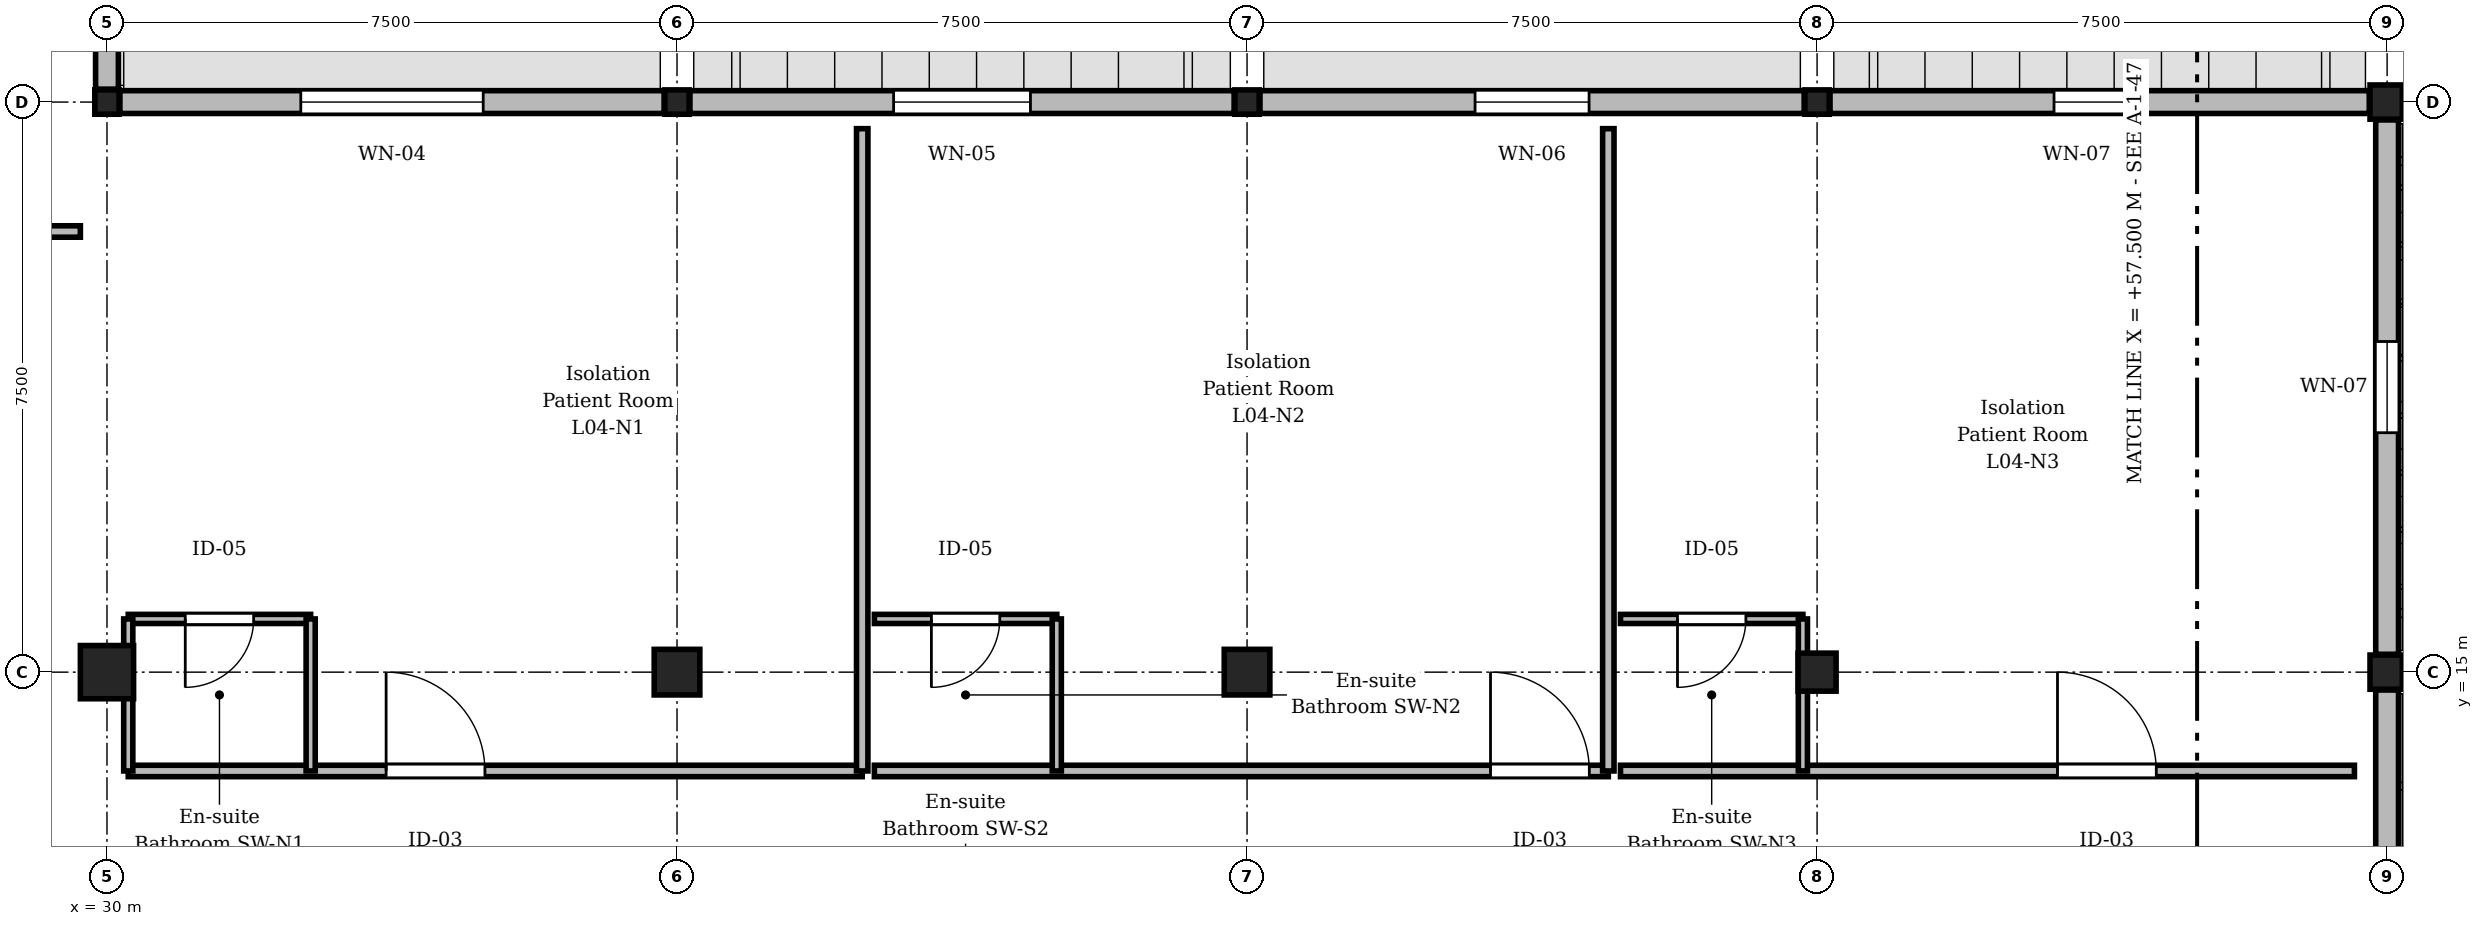
"""IFC4 building model, lengths in metres.
Left out: names, types, materials, properties, quantities, classifications, styles, units other than length and angle.
Written with IfcOpenShell. Run it as: python <this file> out.ifc"""

import sys

from ifc_helpers import new_model, si_unit, direction, frame, frame_2d, origin, origin_2d, place, context, subcontext, project, spatial, rectangle, extrude, element, fill, save


model = new_model("IFC4")
c1 = context("Model", 3, precision=1e-05, world=origin(), true_north=direction((0.0, 1.0)))
c2 = subcontext(c1, "Body", "Model", "MODEL_VIEW")
j1 = project(units=[si_unit("LENGTHUNIT", "METRE"), si_unit("PLANEANGLEUNIT", "RADIAN")], contexts=[c1])
p1 = place(None, origin())
s1 = spatial("IfcSite", under=j1, at=p1, CompositionType="ELEMENT")
p2 = place(p1, origin())
s2 = spatial("IfcBuilding", under=s1, at=p2, CompositionType="ELEMENT")
p3 = place(p2, frame((0.0, 0.0, 17.85)))
s3 = spatial("IfcBuildingStorey", under=s2, at=p3, CompositionType="ELEMENT", Elevation=17.85)
p4 = place(p3, frame((30.0, 15.0, 0.0), z_axis=(0.0, 0.0, 1.0), x_axis=(1.0, 0.0, 0.0)))
e1 = element("IfcColumn", 1, at=p4, inside=s3, PredefinedType="COLUMN", context=c2, shape_type="SweptSolid", body=[
    extrude(rectangle(XDim=0.7, YDim=0.7, at=origin_2d()), origin(), (0.0, 0.0, 1.0), 4.05),
])
p5 = place(p3, frame((30.0, 22.5, 0.0), z_axis=(0.0, 0.0, 1.0), x_axis=(1.0, 0.0, 0.0)))
e2 = element("IfcColumn", 2, at=p5, inside=s3, PredefinedType="COLUMN", context=c2, shape_type="SweptSolid", body=[
    extrude(rectangle(XDim=0.32, YDim=0.32, at=origin_2d()), origin(), (0.0, 0.0, 1.0), 4.05),
])
p6 = place(p3, frame((37.5, 15.0, 0.0), z_axis=(0.0, 0.0, 1.0), x_axis=(1.0, 0.0, 0.0)))
e3 = element("IfcColumn", 3, at=p6, inside=s3, PredefinedType="COLUMN", context=c2, shape_type="SweptSolid", body=[
    extrude(rectangle(XDim=0.6, YDim=0.6, at=origin_2d()), origin(), (0.0, 0.0, 1.0), 4.05),
])
p7 = place(p3, frame((37.5, 22.5, 0.0), z_axis=(0.0, 0.0, 1.0), x_axis=(1.0, 0.0, 0.0)))
e4 = element("IfcColumn", 4, at=p7, inside=s3, PredefinedType="COLUMN", context=c2, shape_type="SweptSolid", body=[
    extrude(rectangle(XDim=0.32, YDim=0.32, at=origin_2d()), origin(), (0.0, 0.0, 1.0), 4.05),
])
p8 = place(p3, frame((45.0, 15.0, 0.0), z_axis=(0.0, 0.0, 1.0), x_axis=(1.0, 0.0, 0.0)))
e5 = element("IfcColumn", 5, at=p8, inside=s3, PredefinedType="COLUMN", context=c2, shape_type="SweptSolid", body=[
    extrude(rectangle(XDim=0.6, YDim=0.6, at=origin_2d()), origin(), (0.0, 0.0, 1.0), 4.05),
])
p9 = place(p3, frame((45.0, 22.5, 0.0), z_axis=(0.0, 0.0, 1.0), x_axis=(1.0, 0.0, 0.0)))
e6 = element("IfcColumn", 6, at=p9, inside=s3, PredefinedType="COLUMN", context=c2, shape_type="SweptSolid", body=[
    extrude(rectangle(XDim=0.32, YDim=0.32, at=origin_2d()), origin(), (0.0, 0.0, 1.0), 4.05),
])
p10 = place(p3, frame((52.5, 15.0, 0.0), z_axis=(0.0, 0.0, 1.0), x_axis=(1.0, 0.0, 0.0)))
e7 = element("IfcColumn", 7, at=p10, inside=s3, PredefinedType="COLUMN", context=c2, shape_type="SweptSolid", body=[
    extrude(rectangle(XDim=0.5, YDim=0.5, at=origin_2d()), origin(), (0.0, 0.0, 1.0), 4.05),
])
p11 = place(p3, frame((52.5, 22.5, 0.0), z_axis=(0.0, 0.0, 1.0), x_axis=(1.0, 0.0, 0.0)))
e8 = element("IfcColumn", 8, at=p11, inside=s3, PredefinedType="COLUMN", context=c2, shape_type="SweptSolid", body=[
    extrude(rectangle(XDim=0.32, YDim=0.32, at=origin_2d()), origin(), (0.0, 0.0, 1.0), 4.05),
])
for number, where, z_axis, x_axis in (
    (9, (60.0, 15.0, 0.0), (0.0, 0.0, 1.0), (1.0, 0.0, 0.0)),
    (10, (60.0, 22.5, 0.0), (0.0, 0.0, 1.0), (1.0, 0.0, 0.0)),
):
    element("IfcColumn", number, at=place(p3, frame(where, z_axis=z_axis, x_axis=x_axis)), inside=s3, PredefinedType="COLUMN", context=c2, shape_type="SweptSolid", body=[
        extrude(rectangle(XDim=0.45, YDim=0.45, at=origin_2d()), origin(), (0.0, 0.0, 1.0), 4.05),
    ])
p12 = place(p3, frame((30.0, 31.33, 0.0), z_axis=(0.0, 0.0, 1.0), x_axis=(0.0, -1.0, 0.0)))
e11 = element("IfcWall", 11, at=p12, inside=s3, PredefinedType="STANDARD", context=c2, shape_type="SweptSolid", body=[
    extrude(rectangle(XDim=8.66, YDim=0.3, at=frame_2d((4.33, 0.0))), origin(), (0.0, 0.0, 1.0), 3.22),
])
p13 = place(p12, frame((3.13, 0.0, 0.9)))
e12 = element("IfcOpeningElement", 12, at=p13, cuts=e11, PredefinedType="OPENING", context=c2, shape_type="SweptSolid", body=[
    extrude(rectangle(XDim=2.4, YDim=2.04, at=frame_2d((1.2, 1.02))), frame((0.0, 0.16, 0.0), z_axis=(0.0, -1.0, 0.0), x_axis=(1.0, 0.0, 0.0)), (0.0, 0.0, 1.0), 0.32),
])
p14 = place(p3, frame((30.17, 22.5, 0.0), z_axis=(0.0, 0.0, 1.0), x_axis=(1.0, 0.0, 0.0)))
e13 = element("IfcWall", 13, at=p14, inside=s3, PredefinedType="STANDARD", context=c2, shape_type="SweptSolid", body=[
    extrude(rectangle(XDim=7.16, YDim=0.3, at=frame_2d((3.58, 0.0))), origin(), (0.0, 0.0, 1.0), 3.17),
])
p15 = place(p14, frame((2.38, 0.0, 0.9)))
e14 = element("IfcOpeningElement", 14, at=p15, cuts=e13, PredefinedType="OPENING", context=c2, shape_type="SweptSolid", body=[
    extrude(rectangle(XDim=2.4, YDim=1.99, at=frame_2d((1.2, 0.995))), frame((0.0, 0.16, 0.0), z_axis=(0.0, -1.0, 0.0), x_axis=(1.0, 0.0, 0.0)), (0.0, 0.0, 1.0), 0.32),
])
p16 = place(p3, frame((37.67, 22.5, 0.0), z_axis=(0.0, 0.0, 1.0), x_axis=(1.0, 0.0, 0.0)))
e15 = element("IfcWall", 15, at=p16, inside=s3, PredefinedType="STANDARD", context=c2, shape_type="SweptSolid", body=[
    extrude(rectangle(XDim=7.16, YDim=0.3, at=frame_2d((3.58, 0.0))), origin(), (0.0, 0.0, 1.0), 3.17),
])
p17 = place(p16, frame((2.68, 0.0, 0.9)))
e16 = element("IfcOpeningElement", 16, at=p17, cuts=e15, PredefinedType="OPENING", context=c2, shape_type="SweptSolid", body=[
    extrude(rectangle(XDim=1.8, YDim=1.99, at=frame_2d((0.9, 0.995))), frame((0.0, 0.16, 0.0), z_axis=(0.0, -1.0, 0.0), x_axis=(1.0, 0.0, 0.0)), (0.0, 0.0, 1.0), 0.32),
])
p18 = place(p3, frame((45.17, 22.5, 0.0), z_axis=(0.0, 0.0, 1.0), x_axis=(1.0, 0.0, 0.0)))
e17 = element("IfcWall", 17, at=p18, inside=s3, PredefinedType="STANDARD", context=c2, shape_type="SweptSolid", body=[
    extrude(rectangle(XDim=7.16, YDim=0.3, at=frame_2d((3.58, 0.0))), origin(), (0.0, 0.0, 1.0), 3.17),
])
p19 = place(p18, frame((2.83, 0.0, 0.9)))
e18 = element("IfcOpeningElement", 18, at=p19, cuts=e17, PredefinedType="OPENING", context=c2, shape_type="SweptSolid", body=[
    extrude(rectangle(XDim=1.5, YDim=1.99, at=frame_2d((0.75, 0.995))), frame((0.0, 0.16, 0.0), z_axis=(0.0, -1.0, 0.0), x_axis=(1.0, 0.0, 0.0)), (0.0, 0.0, 1.0), 0.32),
])
p20 = place(p3, frame((60.0, 14.765, 0.0), z_axis=(0.0, 0.0, 1.0), x_axis=(0.0, -1.0, 0.0)))
e19 = element("IfcWall", 19, at=p20, inside=s3, PredefinedType="STANDARD", context=c2, shape_type="SweptSolid", body=[
    extrude(rectangle(XDim=7.03, YDim=0.3, at=frame_2d((3.515, 0.0))), origin(), (0.0, 0.0, 1.0), 3.17),
])
p21 = place(p20, frame((2.765, 0.0, 0.9)))
e20 = element("IfcOpeningElement", 20, at=p21, cuts=e19, PredefinedType="OPENING", context=c2, shape_type="SweptSolid", body=[
    extrude(rectangle(XDim=1.5, YDim=1.99, at=frame_2d((0.75, 0.995))), frame((0.0, 0.16, 0.0), z_axis=(0.0, -1.0, 0.0), x_axis=(1.0, 0.0, 0.0)), (0.0, 0.0, 1.0), 0.32),
])
p22 = place(p3, frame((52.67, 22.5, 0.0), z_axis=(0.0, 0.0, 1.0), x_axis=(1.0, 0.0, 0.0)))
e21 = element("IfcWall", 21, at=p22, inside=s3, PredefinedType="STANDARD", context=c2, shape_type="SweptSolid", body=[
    extrude(rectangle(XDim=7.095, YDim=0.3, at=frame_2d((3.547, 0.0))), origin(), (0.0, 0.0, 1.0), 3.17),
])
p23 = place(p22, frame((2.948, 0.0, 0.9)))
e22 = element("IfcOpeningElement", 22, at=p23, cuts=e21, PredefinedType="OPENING", context=c2, shape_type="SweptSolid", body=[
    extrude(rectangle(XDim=1.2, YDim=1.99, at=frame_2d((0.6, 0.995))), frame((0.0, 0.16, 0.0), z_axis=(0.0, -1.0, 0.0), x_axis=(1.0, 0.0, 0.0)), (0.0, 0.0, 1.0), 0.32),
])
p24 = place(p3, frame((60.0, 22.265, 0.0), z_axis=(0.0, 0.0, 1.0), x_axis=(0.0, -1.0, 0.0)))
e23 = element("IfcWall", 23, at=p24, inside=s3, PredefinedType="STANDARD", context=c2, shape_type="SweptSolid", body=[
    extrude(rectangle(XDim=7.03, YDim=0.3, at=frame_2d((3.515, 0.0))), origin(), (0.0, 0.0, 1.0), 3.17),
])
p25 = place(p24, frame((2.915, 0.0, 0.9)))
e24 = element("IfcOpeningElement", 24, at=p25, cuts=e23, PredefinedType="OPENING", context=c2, shape_type="SweptSolid", body=[
    extrude(rectangle(XDim=1.2, YDim=1.99, at=frame_2d((0.6, 0.995))), frame((0.0, 0.16, 0.0), z_axis=(0.0, -1.0, 0.0), x_axis=(1.0, 0.0, 0.0)), (0.0, 0.0, 1.0), 0.32),
])
p26 = place(p3, frame((30.28, 13.7, 0.0), z_axis=(0.0, 0.0, 1.0), x_axis=(1.0, 0.0, 0.0)))
e25 = element("IfcWall", 25, at=p26, inside=s3, PredefinedType="PARTITIONING", context=c2, shape_type="SweptSolid", body=[
    extrude(rectangle(XDim=9.657, YDim=0.15, at=frame_2d((4.828, 0.0))), origin(), (0.0, 0.0, 1.0), 3.755),
])
p27 = place(p26, frame((3.393, 0.0, 0.0)))
e26 = element("IfcOpeningElement", 26, at=p27, cuts=e25, PredefinedType="OPENING", context=c2, shape_type="SweptSolid", body=[
    extrude(rectangle(XDim=1.3, YDim=2.2, at=frame_2d((0.65, 1.1))), frame((0.0, 0.085, 0.0), z_axis=(0.0, -1.0, 0.0), x_axis=(1.0, 0.0, 0.0)), (0.0, 0.0, 1.0), 0.17),
])
p28 = place(p3, frame((32.68, 15.7, 0.0), z_axis=(0.0, 0.0, 1.0), x_axis=(-1.0, 0.0, 0.0)))
e27 = element("IfcWall", 27, at=p28, inside=s3, PredefinedType="PARTITIONING", context=c2, shape_type="SweptSolid", body=[
    extrude(rectangle(XDim=2.4, YDim=0.12, at=frame_2d((1.2, 0.0))), origin(), (0.0, 0.0, 1.0), 3.755),
])
p29 = place(p28, frame((0.75, 0.0, 0.0)))
e28 = element("IfcOpeningElement", 28, at=p29, cuts=e27, PredefinedType="OPENING", context=c2, shape_type="SweptSolid", body=[
    extrude(rectangle(XDim=0.9, YDim=2.1, at=frame_2d((0.45, 1.05))), frame((0.0, 0.07, 0.0), z_axis=(0.0, -1.0, 0.0), x_axis=(1.0, 0.0, 0.0)), (0.0, 0.0, 1.0), 0.14),
])
p30 = place(p3, frame((32.68, 13.7, 0.0), z_axis=(0.0, 0.0, 1.0), x_axis=(0.0, 1.0, 0.0)))
e29 = element("IfcWall", 29, at=p30, inside=s3, PredefinedType="PARTITIONING", context=c2, shape_type="SweptSolid", body=[
    extrude(rectangle(XDim=2.0, YDim=0.12, at=frame_2d((1.0, 0.0))), origin(), (0.0, 0.0, 1.0), 3.755),
])
p31 = place(p3, frame((40.097, 13.7, 0.0), z_axis=(0.0, 0.0, 1.0), x_axis=(1.0, 0.0, 0.0)))
e30 = element("IfcWall", 30, at=p31, inside=s3, PredefinedType="PARTITIONING", context=c2, shape_type="SweptSolid", body=[
    extrude(rectangle(XDim=9.657, YDim=0.15, at=frame_2d((4.828, 0.0))), origin(), (0.0, 0.0, 1.0), 3.755),
])
p32 = place(p31, frame((8.107, 0.0, 0.0)))
e31 = element("IfcOpeningElement", 31, at=p32, cuts=e30, PredefinedType="OPENING", context=c2, shape_type="SweptSolid", body=[
    extrude(rectangle(XDim=1.3, YDim=2.2, at=frame_2d((0.65, 1.1))), frame((0.0, 0.085, 0.0), z_axis=(0.0, -1.0, 0.0), x_axis=(1.0, 0.0, 0.0)), (0.0, 0.0, 1.0), 0.17),
])
p33 = place(p3, frame((42.497, 15.7, 0.0), z_axis=(0.0, 0.0, 1.0), x_axis=(-1.0, 0.0, 0.0)))
e32 = element("IfcWall", 32, at=p33, inside=s3, PredefinedType="PARTITIONING", context=c2, shape_type="SweptSolid", body=[
    extrude(rectangle(XDim=2.4, YDim=0.12, at=frame_2d((1.2, 0.0))), origin(), (0.0, 0.0, 1.0), 3.755),
])
p34 = place(p33, frame((0.75, 0.0, 0.0)))
e33 = element("IfcOpeningElement", 33, at=p34, cuts=e32, PredefinedType="OPENING", context=c2, shape_type="SweptSolid", body=[
    extrude(rectangle(XDim=0.9, YDim=2.1, at=frame_2d((0.45, 1.05))), frame((0.0, 0.07, 0.0), z_axis=(0.0, -1.0, 0.0), x_axis=(1.0, 0.0, 0.0)), (0.0, 0.0, 1.0), 0.14),
])
p35 = place(p3, frame((42.497, 13.7, 0.0), z_axis=(0.0, 0.0, 1.0), x_axis=(0.0, 1.0, 0.0)))
e34 = element("IfcWall", 34, at=p35, inside=s3, PredefinedType="PARTITIONING", context=c2, shape_type="SweptSolid", body=[
    extrude(rectangle(XDim=2.0, YDim=0.12, at=frame_2d((1.0, 0.0))), origin(), (0.0, 0.0, 1.0), 3.755),
])
p36 = place(p3, frame((49.913, 13.7, 0.0), z_axis=(0.0, 0.0, 1.0), x_axis=(1.0, 0.0, 0.0)))
e35 = element("IfcWall", 35, at=p36, inside=s3, PredefinedType="PARTITIONING", context=c2, shape_type="SweptSolid", body=[
    extrude(rectangle(XDim=9.657, YDim=0.15, at=frame_2d((4.828, 0.0))), origin(), (0.0, 0.0, 1.0), 3.755),
])
p37 = place(p36, frame((5.75, 0.0, 0.0)))
e36 = element("IfcOpeningElement", 36, at=p37, cuts=e35, PredefinedType="OPENING", context=c2, shape_type="SweptSolid", body=[
    extrude(rectangle(XDim=1.3, YDim=2.2, at=frame_2d((0.65, 1.1))), frame((0.0, 0.085, 0.0), z_axis=(0.0, -1.0, 0.0), x_axis=(1.0, 0.0, 0.0)), (0.0, 0.0, 1.0), 0.17),
])
p38 = place(p3, frame((52.313, 15.7, 0.0), z_axis=(0.0, 0.0, 1.0), x_axis=(-1.0, 0.0, 0.0)))
e37 = element("IfcWall", 37, at=p38, inside=s3, PredefinedType="PARTITIONING", context=c2, shape_type="SweptSolid", body=[
    extrude(rectangle(XDim=2.4, YDim=0.12, at=frame_2d((1.2, 0.0))), origin(), (0.0, 0.0, 1.0), 3.755),
])
p39 = place(p38, frame((0.75, 0.0, 0.0)))
e38 = element("IfcOpeningElement", 38, at=p39, cuts=e37, PredefinedType="OPENING", context=c2, shape_type="SweptSolid", body=[
    extrude(rectangle(XDim=0.9, YDim=2.1, at=frame_2d((0.45, 1.05))), frame((0.0, 0.07, 0.0), z_axis=(0.0, -1.0, 0.0), x_axis=(1.0, 0.0, 0.0)), (0.0, 0.0, 1.0), 0.14),
])
p40 = place(p3, frame((52.313, 13.7, 0.0), z_axis=(0.0, 0.0, 1.0), x_axis=(0.0, 1.0, 0.0)))
e39 = element("IfcWall", 39, at=p40, inside=s3, PredefinedType="PARTITIONING", context=c2, shape_type="SweptSolid", body=[
    extrude(rectangle(XDim=2.0, YDim=0.12, at=frame_2d((1.0, 0.0))), origin(), (0.0, 0.0, 1.0), 3.205),
])
p41 = place(p3, frame((18.45, 20.797, 0.0), z_axis=(0.0, 0.0, 1.0), x_axis=(1.0, 0.0, 0.0)))
e40 = element("IfcWall", 40, at=p41, inside=s3, PredefinedType="PARTITIONING", context=c2, shape_type="SweptSolid", body=[
    extrude(rectangle(XDim=11.2, YDim=0.15, at=frame_2d((5.6, 0.0))), origin(), (0.0, 0.0, 1.0), 3.755),
])
for number, where, z_axis, x_axis in (
    (41, (39.937, 13.7, 0.0), (0.0, 0.0, 1.0), (0.0, 1.0, 0.0)),
    (42, (49.753, 13.7, 0.0), (0.0, 0.0, 1.0), (0.0, 1.0, 0.0)),
):
    element("IfcWall", number, at=place(p3, frame(where, z_axis=z_axis, x_axis=x_axis)), inside=s3, PredefinedType="PARTITIONING", context=c2, shape_type="SweptSolid", body=[
        extrude(rectangle(XDim=8.45, YDim=0.15, at=frame_2d((4.225, 0.0))), origin(), (0.0, 0.0, 1.0), 3.755),
    ])
p42 = place(p3, frame((30.28, 13.7, 0.0), z_axis=(0.0, 0.0, 1.0), x_axis=(0.0, 1.0, 0.0)))
e43 = element("IfcWall", 43, at=p42, inside=s3, PredefinedType="PARTITIONING", context=c2, shape_type="SweptSolid", body=[
    extrude(rectangle(XDim=2.0, YDim=0.12, at=frame_2d((1.0, 0.0))), origin(), (0.0, 0.0, 1.0), 3.205),
])
p43 = place(p15, origin())
e44 = element("IfcWindow", 44, at=p43, inside=s3, PartitioningType="SINGLE_PANEL", PredefinedType="WINDOW", context=c2, shape_type="SweptSolid", body=[
    extrude(rectangle(XDim=2.4, YDim=1.99, at=frame_2d((1.2, 0.995))), frame((0.0, 0.03, 0.0), z_axis=(0.0, -1.0, 0.0), x_axis=(1.0, 0.0, 0.0)), (0.0, 0.0, 1.0), 0.06),
])
fill(e14, e44)
p44 = place(p17, origin())
e45 = element("IfcWindow", 45, at=p44, inside=s3, PartitioningType="SINGLE_PANEL", PredefinedType="WINDOW", context=c2, shape_type="SweptSolid", body=[
    extrude(rectangle(XDim=1.8, YDim=1.99, at=frame_2d((0.9, 0.995))), frame((0.0, 0.03, 0.0), z_axis=(0.0, -1.0, 0.0), x_axis=(1.0, 0.0, 0.0)), (0.0, 0.0, 1.0), 0.06),
])
fill(e16, e45)
p45 = place(p19, origin())
e46 = element("IfcWindow", 46, at=p45, inside=s3, PartitioningType="SINGLE_PANEL", PredefinedType="WINDOW", context=c2, shape_type="SweptSolid", body=[
    extrude(rectangle(XDim=1.5, YDim=1.99, at=frame_2d((0.75, 0.995))), frame((0.0, 0.03, 0.0), z_axis=(0.0, -1.0, 0.0), x_axis=(1.0, 0.0, 0.0)), (0.0, 0.0, 1.0), 0.06),
])
fill(e18, e46)
p46 = place(p23, origin())
e47 = element("IfcWindow", 47, at=p46, inside=s3, PartitioningType="SINGLE_PANEL", PredefinedType="WINDOW", context=c2, shape_type="SweptSolid", body=[
    extrude(rectangle(XDim=1.2, YDim=1.99, at=frame_2d((0.6, 0.995))), frame((0.0, 0.03, 0.0), z_axis=(0.0, -1.0, 0.0), x_axis=(1.0, 0.0, 0.0)), (0.0, 0.0, 1.0), 0.06),
])
fill(e22, e47)
p47 = place(p25, origin())
e48 = element("IfcWindow", 48, at=p47, inside=s3, PartitioningType="SINGLE_PANEL", PredefinedType="WINDOW", context=c2, shape_type="SweptSolid", body=[
    extrude(rectangle(XDim=1.2, YDim=1.99, at=frame_2d((0.6, 0.995))), frame((0.0, 0.03, 0.0), z_axis=(0.0, -1.0, 0.0), x_axis=(1.0, 0.0, 0.0)), (0.0, 0.0, 1.0), 0.06),
])
fill(e24, e48)
p48 = place(p27, origin())
e49 = element("IfcDoor", 49, at=p48, inside=s3, OperationType="SINGLE_SWING_LEFT", PredefinedType="DOOR", context=c2, shape_type="SweptSolid", body=[
    extrude(rectangle(XDim=1.3, YDim=2.2, at=frame_2d((0.65, 1.1))), frame((0.0, 0.025, 0.0), z_axis=(0.0, -1.0, 0.0), x_axis=(1.0, 0.0, 0.0)), (0.0, 0.0, 1.0), 0.05),
])
fill(e26, e49)
p49 = place(p29, origin())
e50 = element("IfcDoor", 50, at=p49, inside=s3, OperationType="SINGLE_SWING_RIGHT", PredefinedType="DOOR", context=c2, shape_type="SweptSolid", body=[
    extrude(rectangle(XDim=0.9, YDim=2.1, at=frame_2d((0.45, 1.05))), frame((0.0, 0.025, 0.0), z_axis=(0.0, -1.0, 0.0), x_axis=(1.0, 0.0, 0.0)), (0.0, 0.0, 1.0), 0.05),
])
fill(e28, e50)
p50 = place(p32, origin())
e51 = element("IfcDoor", 51, at=p50, inside=s3, OperationType="SINGLE_SWING_LEFT", PredefinedType="DOOR", context=c2, shape_type="SweptSolid", body=[
    extrude(rectangle(XDim=1.3, YDim=2.2, at=frame_2d((0.65, 1.1))), frame((0.0, 0.025, 0.0), z_axis=(0.0, -1.0, 0.0), x_axis=(1.0, 0.0, 0.0)), (0.0, 0.0, 1.0), 0.05),
])
fill(e31, e51)
p51 = place(p34, origin())
e52 = element("IfcDoor", 52, at=p51, inside=s3, OperationType="SINGLE_SWING_RIGHT", PredefinedType="DOOR", context=c2, shape_type="SweptSolid", body=[
    extrude(rectangle(XDim=0.9, YDim=2.1, at=frame_2d((0.45, 1.05))), frame((0.0, 0.025, 0.0), z_axis=(0.0, -1.0, 0.0), x_axis=(1.0, 0.0, 0.0)), (0.0, 0.0, 1.0), 0.05),
])
fill(e33, e52)
p52 = place(p37, origin())
e53 = element("IfcDoor", 53, at=p52, inside=s3, OperationType="SINGLE_SWING_LEFT", PredefinedType="DOOR", context=c2, shape_type="SweptSolid", body=[
    extrude(rectangle(XDim=1.3, YDim=2.2, at=frame_2d((0.65, 1.1))), frame((0.0, 0.025, 0.0), z_axis=(0.0, -1.0, 0.0), x_axis=(1.0, 0.0, 0.0)), (0.0, 0.0, 1.0), 0.05),
])
fill(e36, e53)
p53 = place(p39, origin())
e54 = element("IfcDoor", 54, at=p53, inside=s3, OperationType="SINGLE_SWING_RIGHT", PredefinedType="DOOR", context=c2, shape_type="SweptSolid", body=[
    extrude(rectangle(XDim=0.9, YDim=2.1, at=frame_2d((0.45, 1.05))), frame((0.0, 0.025, 0.0), z_axis=(0.0, -1.0, 0.0), x_axis=(1.0, 0.0, 0.0)), (0.0, 0.0, 1.0), 0.05),
])
fill(e38, e54)
save(model, sys.argv[1])
